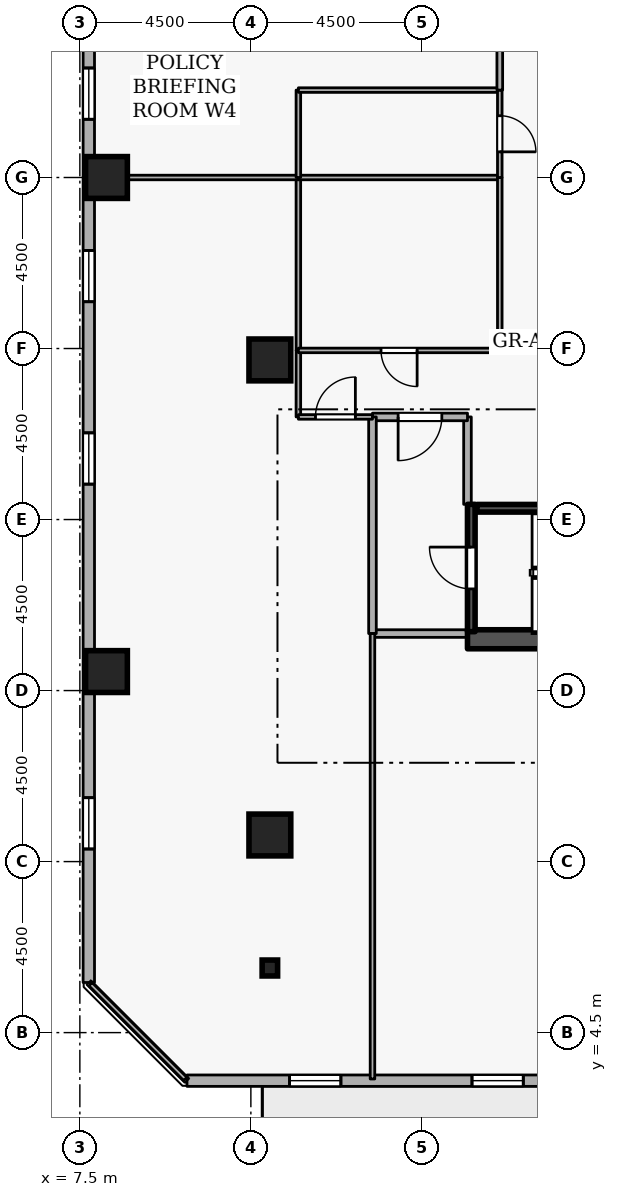
"""IFC4 building model, lengths in metres.
Left out: names, types, materials, properties, quantities, classifications, styles, units other than length and angle.
Written with IfcOpenShell. Run it as: python <this file> out.ifc"""

import sys

from ifc_helpers import new_model, si_unit, direction, frame, frame_2d, origin, origin_2d, place, context, subcontext, project, spatial, rectangle, i_section, extrude, element, fill, save


model = new_model("IFC4")
c1 = context("Model", 3, precision=1e-05, world=origin(), true_north=direction((0.0, 1.0)))
c2 = subcontext(c1, "Body", "Model", "MODEL_VIEW")
j1 = project(units=[si_unit("LENGTHUNIT", "METRE"), si_unit("PLANEANGLEUNIT", "RADIAN")], contexts=[c1])
p1 = place(None, origin())
s1 = spatial("IfcSite", under=j1, at=p1, CompositionType="ELEMENT")
p2 = place(p1, origin())
s2 = spatial("IfcBuilding", under=s1, at=p2, CompositionType="ELEMENT")
p3 = place(p2, frame((0.0, 0.0, 170.7)))
s3 = spatial("IfcBuildingStorey", under=s2, at=p3, CompositionType="ELEMENT", Elevation=170.7)
p4 = place(p3, frame((17.7, 14.85, 0.0), z_axis=(0.0, 0.0, 1.0), x_axis=(1.0, 0.0, 0.0)))
e1 = element("IfcWall", 1, at=p4, inside=s3, PredefinedType="SHEAR", context=c2, shape_type="SweptSolid", body=[
    extrude(rectangle(XDim=15.6, YDim=0.5, at=frame_2d((7.8, 0.0))), origin(), (0.0, 0.0, 1.0), 3.6),
])
for number, where, z_axis, x_axis in (
    (2, (12.5, 9.7, 0.0), (0.0, 0.0, 1.0), (1.0, 0.0, 0.0)),
    (3, (8.2, 14.0, 0.0), (0.0, 0.0, 1.0), (1.0, 0.0, 0.0)),
    (4, (8.2, 27.0, 0.0), (0.0, 0.0, 1.0), (1.0, 0.0, 0.0)),
    (5, (12.5, 22.2, 0.0), (0.0, 0.0, 1.0), (1.0, 0.0, 0.0)),
):
    element("IfcColumn", number, at=place(p3, frame(where, z_axis=z_axis, x_axis=x_axis)), inside=s3, PredefinedType="COLUMN", context=c2, shape_type="SweptSolid", body=[
        extrude(rectangle(XDim=1.1, YDim=1.1, at=origin_2d()), origin(), (0.0, 0.0, 1.0), 3.6),
    ])
p5 = place(p3, frame((12.5, 6.2, 0.0), z_axis=(0.0, 0.0, 1.0), x_axis=(1.0, 0.0, 0.0)))
e6 = element("IfcColumn", 6, at=p5, inside=s3, PredefinedType="COLUMN", context=c2, shape_type="SweptSolid", body=[
    extrude(i_section(OverallWidth=0.407, OverallDepth=0.419, WebThickness=0.031, FlangeThickness=0.049, FilletRadius=0.015, at=origin_2d()), origin(), (0.0, 0.0, 1.0), 3.6),
])
p6 = place(p3, frame((10.319, 3.235, 0.0), z_axis=(0.0, 0.0, 1.0), x_axis=(1.0, 0.0, 0.0)))
e7 = element("IfcWall", 7, at=p6, inside=s3, PredefinedType="STANDARD", context=c2, shape_type="SweptSolid", body=[
    extrude(rectangle(XDim=36.363, YDim=0.3, at=frame_2d((18.181, 0.0))), origin(), (0.0, 0.0, 1.0), 2.22),
])
p7 = place(p6, frame((23.581, 0.0, 0.0)))
e8 = element("IfcOpeningElement", 8, at=p7, cuts=e7, PredefinedType="OPENING", context=c2, shape_type="SweptSolid", body=[
    extrude(rectangle(XDim=1.0, YDim=2.08, at=frame_2d((0.5, 1.04))), frame((0.0, 0.16, 0.0), z_axis=(0.0, -1.0, 0.0), x_axis=(1.0, 0.0, 0.0)), (0.0, 0.0, 1.0), 0.32),
])
p8 = place(p6, frame((2.7, 0.0, 0.72)))
e9 = element("IfcOpeningElement", 9, at=p8, cuts=e7, PredefinedType="OPENING", context=c2, shape_type="SweptSolid", body=[
    extrude(rectangle(XDim=1.35, YDim=1.05, at=frame_2d((0.675, 0.525))), frame((0.0, 0.16, 0.0), z_axis=(0.0, -1.0, 0.0), x_axis=(1.0, 0.0, 0.0)), (0.0, 0.0, 1.0), 0.32),
])
p9 = place(p6, frame((7.5, 0.0, 0.72)))
e10 = element("IfcOpeningElement", 10, at=p9, cuts=e7, PredefinedType="OPENING", context=c2, shape_type="SweptSolid", body=[
    extrude(rectangle(XDim=1.35, YDim=1.05, at=frame_2d((0.675, 0.525))), frame((0.0, 0.16, 0.0), z_axis=(0.0, -1.0, 0.0), x_axis=(1.0, 0.0, 0.0)), (0.0, 0.0, 1.0), 0.32),
])
p10 = place(p6, frame((12.3, 0.0, 0.72)))
e11 = element("IfcOpeningElement", 11, at=p10, cuts=e7, PredefinedType="OPENING", context=c2, shape_type="SweptSolid", body=[
    extrude(rectangle(XDim=1.35, YDim=1.05, at=frame_2d((0.675, 0.525))), frame((0.0, 0.16, 0.0), z_axis=(0.0, -1.0, 0.0), x_axis=(1.0, 0.0, 0.0)), (0.0, 0.0, 1.0), 0.32),
])
p11 = place(p6, frame((17.1, 0.0, 0.72)))
e12 = element("IfcOpeningElement", 12, at=p11, cuts=e7, PredefinedType="OPENING", context=c2, shape_type="SweptSolid", body=[
    extrude(rectangle(XDim=1.35, YDim=1.05, at=frame_2d((0.675, 0.525))), frame((0.0, 0.16, 0.0), z_axis=(0.0, -1.0, 0.0), x_axis=(1.0, 0.0, 0.0)), (0.0, 0.0, 1.0), 0.32),
])
p12 = place(p6, frame((26.7, 0.0, 0.72)))
e13 = element("IfcOpeningElement", 13, at=p12, cuts=e7, PredefinedType="OPENING", context=c2, shape_type="SweptSolid", body=[
    extrude(rectangle(XDim=1.35, YDim=1.05, at=frame_2d((0.675, 0.525))), frame((0.0, 0.16, 0.0), z_axis=(0.0, -1.0, 0.0), x_axis=(1.0, 0.0, 0.0)), (0.0, 0.0, 1.0), 0.32),
])
p13 = place(p6, frame((31.5, 0.0, 0.72)))
e14 = element("IfcOpeningElement", 14, at=p13, cuts=e7, PredefinedType="OPENING", context=c2, shape_type="SweptSolid", body=[
    extrude(rectangle(XDim=1.35, YDim=1.05, at=frame_2d((0.675, 0.525))), frame((0.0, 0.16, 0.0), z_axis=(0.0, -1.0, 0.0), x_axis=(1.0, 0.0, 0.0)), (0.0, 0.0, 1.0), 0.32),
])
p14 = place(p3, frame((7.735, 42.181, 0.0), z_axis=(0.0, 0.0, 1.0), x_axis=(0.0, -1.0, 0.0)))
e15 = element("IfcWall", 15, at=p14, inside=s3, PredefinedType="STANDARD", context=c2, shape_type="SweptSolid", body=[
    extrude(rectangle(XDim=36.363, YDim=0.3, at=frame_2d((18.181, 0.0))), origin(), (0.0, 0.0, 1.0), 2.22),
])
p15 = place(p14, frame((7.5, 0.0, 0.72)))
e16 = element("IfcOpeningElement", 16, at=p15, cuts=e15, PredefinedType="OPENING", context=c2, shape_type="SweptSolid", body=[
    extrude(rectangle(XDim=1.35, YDim=1.05, at=frame_2d((0.675, 0.525))), frame((0.0, 0.16, 0.0), z_axis=(0.0, -1.0, 0.0), x_axis=(1.0, 0.0, 0.0)), (0.0, 0.0, 1.0), 0.32),
])
p16 = place(p14, frame((12.3, 0.0, 0.72)))
e17 = element("IfcOpeningElement", 17, at=p16, cuts=e15, PredefinedType="OPENING", context=c2, shape_type="SweptSolid", body=[
    extrude(rectangle(XDim=1.35, YDim=1.05, at=frame_2d((0.675, 0.525))), frame((0.0, 0.16, 0.0), z_axis=(0.0, -1.0, 0.0), x_axis=(1.0, 0.0, 0.0)), (0.0, 0.0, 1.0), 0.32),
])
p17 = place(p14, frame((17.1, 0.0, 0.72)))
e18 = element("IfcOpeningElement", 18, at=p17, cuts=e15, PredefinedType="OPENING", context=c2, shape_type="SweptSolid", body=[
    extrude(rectangle(XDim=1.35, YDim=1.05, at=frame_2d((0.675, 0.525))), frame((0.0, 0.16, 0.0), z_axis=(0.0, -1.0, 0.0), x_axis=(1.0, 0.0, 0.0)), (0.0, 0.0, 1.0), 0.32),
])
p18 = place(p14, frame((21.9, 0.0, 0.72)))
e19 = element("IfcOpeningElement", 19, at=p18, cuts=e15, PredefinedType="OPENING", context=c2, shape_type="SweptSolid", body=[
    extrude(rectangle(XDim=1.35, YDim=1.05, at=frame_2d((0.675, 0.525))), frame((0.0, 0.16, 0.0), z_axis=(0.0, -1.0, 0.0), x_axis=(1.0, 0.0, 0.0)), (0.0, 0.0, 1.0), 0.32),
])
p19 = place(p14, frame((31.5, 0.0, 0.72)))
e20 = element("IfcOpeningElement", 20, at=p19, cuts=e15, PredefinedType="OPENING", context=c2, shape_type="SweptSolid", body=[
    extrude(rectangle(XDim=1.35, YDim=1.05, at=frame_2d((0.675, 0.525))), frame((0.0, 0.16, 0.0), z_axis=(0.0, -1.0, 0.0), x_axis=(1.0, 0.0, 0.0)), (0.0, 0.0, 1.0), 0.32),
])
p20 = place(p3, frame((17.8, 15.05, 0.0), z_axis=(0.0, 0.0, 1.0), x_axis=(0.0, 1.0, 0.0)))
e21 = element("IfcWall", 21, at=p20, inside=s3, PredefinedType="SHEAR", context=c2, shape_type="SweptSolid", body=[
    extrude(rectangle(XDim=3.35, YDim=0.2, at=frame_2d((1.675, 0.0))), origin(), (0.0, 0.0, 1.0), 3.6),
])
p21 = place(p20, frame((1.125, 0.0, 0.0)))
e22 = element("IfcOpeningElement", 22, at=p21, cuts=e21, PredefinedType="OPENING", context=c2, shape_type="SweptSolid", body=[
    extrude(rectangle(XDim=1.1, YDim=2.1, at=frame_2d((0.55, 1.05))), frame((0.0, 0.11, 0.0), z_axis=(0.0, -1.0, 0.0), x_axis=(1.0, 0.0, 0.0)), (0.0, 0.0, 1.0), 0.22),
])
p22 = place(p3, frame((25.05, 18.297, 0.0), z_axis=(0.0, 0.0, 1.0), x_axis=(-1.0, 0.0, 0.0)))
e23 = element("IfcWall", 23, at=p22, inside=s3, PredefinedType="SHEAR", context=c2, shape_type="SweptSolid", body=[
    extrude(rectangle(XDim=7.1, YDim=0.2, at=frame_2d((3.55, 0.0))), origin(), (0.0, 0.0, 1.0), 3.6),
])
p23 = place(p3, frame((15.2, 15.0, 0.0), z_axis=(0.0, 0.0, 1.0), x_axis=(1.0, 0.0, 0.0)))
e24 = element("IfcWall", 24, at=p23, inside=s3, PredefinedType="STANDARD", context=c2, shape_type="SweptSolid", body=[
    extrude(rectangle(XDim=2.5, YDim=0.2, at=frame_2d((1.25, 0.0))), origin(), (0.0, 0.0, 1.0), 3.26),
])
p24 = place(p3, frame((17.7, 18.4, 0.0), z_axis=(0.0, 0.0, 1.0), x_axis=(0.0, 1.0, 0.0)))
e25 = element("IfcWall", 25, at=p24, inside=s3, PredefinedType="STANDARD", context=c2, shape_type="SweptSolid", body=[
    extrude(rectangle(XDim=2.3, YDim=0.2, at=frame_2d((1.15, 0.0))), origin(), (0.0, 0.0, 1.0), 2.465),
])
p25 = place(p3, frame((17.7, 20.7, 0.0), z_axis=(0.0, 0.0, 1.0), x_axis=(-1.0, 0.0, 0.0)))
e26 = element("IfcWall", 26, at=p25, inside=s3, PredefinedType="STANDARD", context=c2, shape_type="SweptSolid", body=[
    extrude(rectangle(XDim=2.5, YDim=0.2, at=frame_2d((1.25, 0.0))), origin(), (0.0, 0.0, 1.0), 3.26),
])
p26 = place(p25, frame((0.675, 0.0, 0.0)))
e27 = element("IfcOpeningElement", 27, at=p26, cuts=e26, PredefinedType="OPENING", context=c2, shape_type="SweptSolid", body=[
    extrude(rectangle(XDim=1.15, YDim=2.1, at=frame_2d((0.575, 1.05))), frame((0.0, 0.11, 0.0), z_axis=(0.0, -1.0, 0.0), x_axis=(1.0, 0.0, 0.0)), (0.0, 0.0, 1.0), 0.22),
])
p27 = place(p3, frame((15.2, 20.7, 0.0), z_axis=(0.0, 0.0, 1.0), x_axis=(0.0, -1.0, 0.0)))
e28 = element("IfcWall", 28, at=p27, inside=s3, PredefinedType="STANDARD", context=c2, shape_type="SweptSolid", body=[
    extrude(rectangle(XDim=5.7, YDim=0.2, at=frame_2d((2.85, 0.0))), origin(), (0.0, 0.0, 1.0), 3.26),
])
p28 = place(p3, frame((13.25, 27.0, 0.0), z_axis=(0.0, 0.0, 1.0), x_axis=(0.0, -1.0, 0.0)))
e29 = element("IfcWall", 29, at=p28, inside=s3, PredefinedType="PARTITIONING", context=c2, shape_type="SweptSolid", body=[
    extrude(rectangle(XDim=4.55, YDim=0.12, at=frame_2d((2.275, 0.0))), origin(), (0.0, 0.0, 1.0), 3.26),
])
p29 = place(p3, frame((13.25, 22.45, 0.0), z_axis=(0.0, 0.0, 1.0), x_axis=(0.0, -1.0, 0.0)))
e30 = element("IfcWall", 30, at=p29, inside=s3, PredefinedType="PARTITIONING", context=c2, shape_type="SweptSolid", body=[
    extrude(rectangle(XDim=1.75, YDim=0.12, at=frame_2d((0.875, 0.0))), origin(), (0.0, 0.0, 1.0), 3.26),
])
p30 = place(p3, frame((13.25, 20.7, 0.0), z_axis=(0.0, 0.0, 1.0), x_axis=(1.0, 0.0, 0.0)))
e31 = element("IfcWall", 31, at=p30, inside=s3, PredefinedType="PARTITIONING", context=c2, shape_type="SweptSolid", body=[
    extrude(rectangle(XDim=1.95, YDim=0.12, at=frame_2d((0.975, 0.0))), origin(), (0.0, 0.0, 1.0), 3.26),
])
p31 = place(p30, frame((0.45, 0.0, 0.0)))
e32 = element("IfcOpeningElement", 32, at=p31, cuts=e31, PredefinedType="OPENING", context=c2, shape_type="SweptSolid", body=[
    extrude(rectangle(XDim=1.05, YDim=2.1, at=frame_2d((0.525, 1.05))), frame((0.0, 0.07, 0.0), z_axis=(0.0, -1.0, 0.0), x_axis=(1.0, 0.0, 0.0)), (0.0, 0.0, 1.0), 0.14),
])
p32 = place(p3, frame((15.2, 15.0, 0.0), z_axis=(0.0, 0.0, 1.0), x_axis=(0.0, -1.0, 0.0)))
e33 = element("IfcWall", 33, at=p32, inside=s3, PredefinedType="PARTITIONING", context=c2, shape_type="SweptSolid", body=[
    extrude(rectangle(XDim=11.72, YDim=0.12, at=frame_2d((5.86, 0.0))), origin(), (0.0, 0.0, 1.0), 3.26),
])
p33 = place(p3, frame((10.275, 3.28, 0.0), z_axis=(0.0, 0.0, 1.0), x_axis=(-0.707106781187, 0.707106781187, 0.0)))
e34 = element("IfcWall", 34, at=p33, inside=s3, PredefinedType="PARTITIONING", context=c2, shape_type="SweptSolid", body=[
    extrude(rectangle(XDim=3.528, YDim=0.12, at=frame_2d((1.764, 0.0))), origin(), (0.0, 0.0, 1.0), 3.26),
])
p34 = place(p3, frame((7.78, 27.0, 0.0), z_axis=(0.0, 0.0, 1.0), x_axis=(1.0, 0.0, 0.0)))
e35 = element("IfcWall", 35, at=p34, inside=s3, PredefinedType="PARTITIONING", context=c2, shape_type="SweptSolid", body=[
    extrude(rectangle(XDim=5.47, YDim=0.12, at=frame_2d((2.735, 0.0))), origin(), (0.0, 0.0, 1.0), 2.802),
])
p35 = place(p3, frame((13.25, 27.0, 0.0), z_axis=(0.0, 0.0, 1.0), x_axis=(1.0, 0.0, 0.0)))
e36 = element("IfcWall", 36, at=p35, inside=s3, PredefinedType="PARTITIONING", context=c2, shape_type="SweptSolid", body=[
    extrude(rectangle(XDim=5.3, YDim=0.12, at=frame_2d((2.65, 0.0))), origin(), (0.0, 0.0, 1.0), 2.802),
])
p36 = place(p3, frame((18.55, 27.0, 0.0), z_axis=(0.0, 0.0, 1.0), x_axis=(0.0, -1.0, 0.0)))
e37 = element("IfcWall", 37, at=p36, inside=s3, PredefinedType="PARTITIONING", context=c2, shape_type="SweptSolid", body=[
    extrude(rectangle(XDim=4.55, YDim=0.12, at=frame_2d((2.275, 0.0))), origin(), (0.0, 0.0, 1.0), 3.26),
])
p37 = place(p3, frame((18.55, 22.45, 0.0), z_axis=(0.0, 0.0, 1.0), x_axis=(-1.0, 0.0, 0.0)))
e38 = element("IfcWall", 38, at=p37, inside=s3, PredefinedType="PARTITIONING", context=c2, shape_type="SweptSolid", body=[
    extrude(rectangle(XDim=5.3, YDim=0.12, at=frame_2d((2.65, 0.0))), origin(), (0.0, 0.0, 1.0), 3.26),
])
p38 = place(p37, frame((2.175, 0.0, 0.0)))
e39 = element("IfcOpeningElement", 39, at=p38, cuts=e38, PredefinedType="OPENING", context=c2, shape_type="SweptSolid", body=[
    extrude(rectangle(XDim=0.95, YDim=2.1, at=frame_2d((0.475, 1.05))), frame((0.0, 0.07, 0.0), z_axis=(0.0, -1.0, 0.0), x_axis=(1.0, 0.0, 0.0)), (0.0, 0.0, 1.0), 0.14),
])
p39 = place(p3, frame((13.25, 27.0, 0.0), z_axis=(0.0, 0.0, 1.0), x_axis=(0.0, 1.0, 0.0)))
e40 = element("IfcWall", 40, at=p39, inside=s3, PredefinedType="PARTITIONING", context=c2, shape_type="SweptSolid", body=[
    extrude(rectangle(XDim=2.3, YDim=0.12, at=frame_2d((1.15, 0.0))), origin(), (0.0, 0.0, 1.0), 3.26),
])
p40 = place(p3, frame((13.25, 29.3, 0.0), z_axis=(0.0, 0.0, 1.0), x_axis=(1.0, 0.0, 0.0)))
e41 = element("IfcWall", 41, at=p40, inside=s3, PredefinedType="PARTITIONING", context=c2, shape_type="SweptSolid", body=[
    extrude(rectangle(XDim=5.3, YDim=0.12, at=frame_2d((2.65, 0.0))), origin(), (0.0, 0.0, 1.0), 3.26),
])
p41 = place(p3, frame((18.55, 29.3, 0.0), z_axis=(0.0, 0.0, 1.0), x_axis=(0.0, -1.0, 0.0)))
e42 = element("IfcWall", 42, at=p41, inside=s3, PredefinedType="PARTITIONING", context=c2, shape_type="SweptSolid", body=[
    extrude(rectangle(XDim=2.3, YDim=0.12, at=frame_2d((1.15, 0.0))), origin(), (0.0, 0.0, 1.0), 3.26),
])
p42 = place(p41, frame((0.675, 0.0, 0.0)))
e43 = element("IfcOpeningElement", 43, at=p42, cuts=e42, PredefinedType="OPENING", context=c2, shape_type="SweptSolid", body=[
    extrude(rectangle(XDim=0.95, YDim=2.1, at=frame_2d((0.475, 1.05))), frame((0.0, 0.07, 0.0), z_axis=(0.0, -1.0, 0.0), x_axis=(1.0, 0.0, 0.0)), (0.0, 0.0, 1.0), 0.14),
])
p43 = place(p3, frame((18.55, 31.55, 0.0), z_axis=(0.0, 0.0, 1.0), x_axis=(0.0, -1.0, 0.0)))
e44 = element("IfcWall", 44, at=p43, inside=s3, PredefinedType="PARTITIONING", context=c2, shape_type="SweptSolid", body=[
    extrude(rectangle(XDim=2.25, YDim=0.15, at=frame_2d((1.125, 0.0))), origin(), (0.0, 0.0, 1.0), 3.26),
])
p44 = place(p8, origin())
e45 = element("IfcWindow", 45, at=p44, inside=s3, PartitioningType="SINGLE_PANEL", PredefinedType="WINDOW", context=c2, shape_type="SweptSolid", body=[
    extrude(rectangle(XDim=1.35, YDim=1.05, at=frame_2d((0.675, 0.525))), frame((0.0, 0.03, 0.0), z_axis=(0.0, -1.0, 0.0), x_axis=(1.0, 0.0, 0.0)), (0.0, 0.0, 1.0), 0.06),
])
fill(e9, e45)
p45 = place(p9, origin())
e46 = element("IfcWindow", 46, at=p45, inside=s3, PartitioningType="SINGLE_PANEL", PredefinedType="WINDOW", context=c2, shape_type="SweptSolid", body=[
    extrude(rectangle(XDim=1.35, YDim=1.05, at=frame_2d((0.675, 0.525))), frame((0.0, 0.03, 0.0), z_axis=(0.0, -1.0, 0.0), x_axis=(1.0, 0.0, 0.0)), (0.0, 0.0, 1.0), 0.06),
])
fill(e10, e46)
p46 = place(p16, origin())
e47 = element("IfcWindow", 47, at=p46, inside=s3, PartitioningType="SINGLE_PANEL", PredefinedType="WINDOW", context=c2, shape_type="SweptSolid", body=[
    extrude(rectangle(XDim=1.35, YDim=1.05, at=frame_2d((0.675, 0.525))), frame((0.0, 0.03, 0.0), z_axis=(0.0, -1.0, 0.0), x_axis=(1.0, 0.0, 0.0)), (0.0, 0.0, 1.0), 0.06),
])
fill(e17, e47)
p47 = place(p17, origin())
e48 = element("IfcWindow", 48, at=p47, inside=s3, PartitioningType="SINGLE_PANEL", PredefinedType="WINDOW", context=c2, shape_type="SweptSolid", body=[
    extrude(rectangle(XDim=1.35, YDim=1.05, at=frame_2d((0.675, 0.525))), frame((0.0, 0.03, 0.0), z_axis=(0.0, -1.0, 0.0), x_axis=(1.0, 0.0, 0.0)), (0.0, 0.0, 1.0), 0.06),
])
fill(e18, e48)
p48 = place(p18, origin())
e49 = element("IfcWindow", 49, at=p48, inside=s3, PartitioningType="SINGLE_PANEL", PredefinedType="WINDOW", context=c2, shape_type="SweptSolid", body=[
    extrude(rectangle(XDim=1.35, YDim=1.05, at=frame_2d((0.675, 0.525))), frame((0.0, 0.03, 0.0), z_axis=(0.0, -1.0, 0.0), x_axis=(1.0, 0.0, 0.0)), (0.0, 0.0, 1.0), 0.06),
])
fill(e19, e49)
p49 = place(p19, origin())
e50 = element("IfcWindow", 50, at=p49, inside=s3, PartitioningType="SINGLE_PANEL", PredefinedType="WINDOW", context=c2, shape_type="SweptSolid", body=[
    extrude(rectangle(XDim=1.35, YDim=1.05, at=frame_2d((0.675, 0.525))), frame((0.0, 0.03, 0.0), z_axis=(0.0, -1.0, 0.0), x_axis=(1.0, 0.0, 0.0)), (0.0, 0.0, 1.0), 0.06),
])
fill(e20, e50)
p50 = place(p21, origin())
e51 = element("IfcDoor", 51, at=p50, inside=s3, OperationType="SINGLE_SWING_RIGHT", PredefinedType="DOOR", context=c2, shape_type="SweptSolid", body=[
    extrude(rectangle(XDim=1.1, YDim=2.1, at=frame_2d((0.55, 1.05))), frame((0.0, 0.025, 0.0), z_axis=(0.0, -1.0, 0.0), x_axis=(1.0, 0.0, 0.0)), (0.0, 0.0, 1.0), 0.05),
])
fill(e22, e51)
p51 = place(p26, origin())
e52 = element("IfcDoor", 52, at=p51, inside=s3, OperationType="SINGLE_SWING_RIGHT", PredefinedType="DOOR", context=c2, shape_type="SweptSolid", body=[
    extrude(rectangle(XDim=1.15, YDim=2.1, at=frame_2d((0.575, 1.05))), frame((0.0, 0.025, 0.0), z_axis=(0.0, -1.0, 0.0), x_axis=(1.0, 0.0, 0.0)), (0.0, 0.0, 1.0), 0.05),
])
fill(e27, e52)
p52 = place(p31, origin())
e53 = element("IfcDoor", 53, at=p52, inside=s3, OperationType="SINGLE_SWING_RIGHT", PredefinedType="DOOR", context=c2, shape_type="SweptSolid", body=[
    extrude(rectangle(XDim=1.05, YDim=2.1, at=frame_2d((0.525, 1.05))), frame((0.0, 0.025, 0.0), z_axis=(0.0, -1.0, 0.0), x_axis=(1.0, 0.0, 0.0)), (0.0, 0.0, 1.0), 0.05),
])
fill(e32, e53)
p53 = place(p38, origin())
e54 = element("IfcDoor", 54, at=p53, inside=s3, OperationType="SINGLE_SWING_LEFT", PredefinedType="DOOR", context=c2, shape_type="SweptSolid", body=[
    extrude(rectangle(XDim=0.95, YDim=2.1, at=frame_2d((0.475, 1.05))), frame((0.0, 0.025, 0.0), z_axis=(0.0, -1.0, 0.0), x_axis=(1.0, 0.0, 0.0)), (0.0, 0.0, 1.0), 0.05),
])
fill(e39, e54)
p54 = place(p42, origin())
e55 = element("IfcDoor", 55, at=p54, inside=s3, OperationType="SINGLE_SWING_RIGHT", PredefinedType="DOOR", context=c2, shape_type="SweptSolid", body=[
    extrude(rectangle(XDim=0.95, YDim=2.1, at=frame_2d((0.475, 1.05))), frame((0.0, 0.025, 0.0), z_axis=(0.0, -1.0, 0.0), x_axis=(1.0, 0.0, 0.0)), (0.0, 0.0, 1.0), 0.05),
])
fill(e43, e55)
save(model, sys.argv[1])
